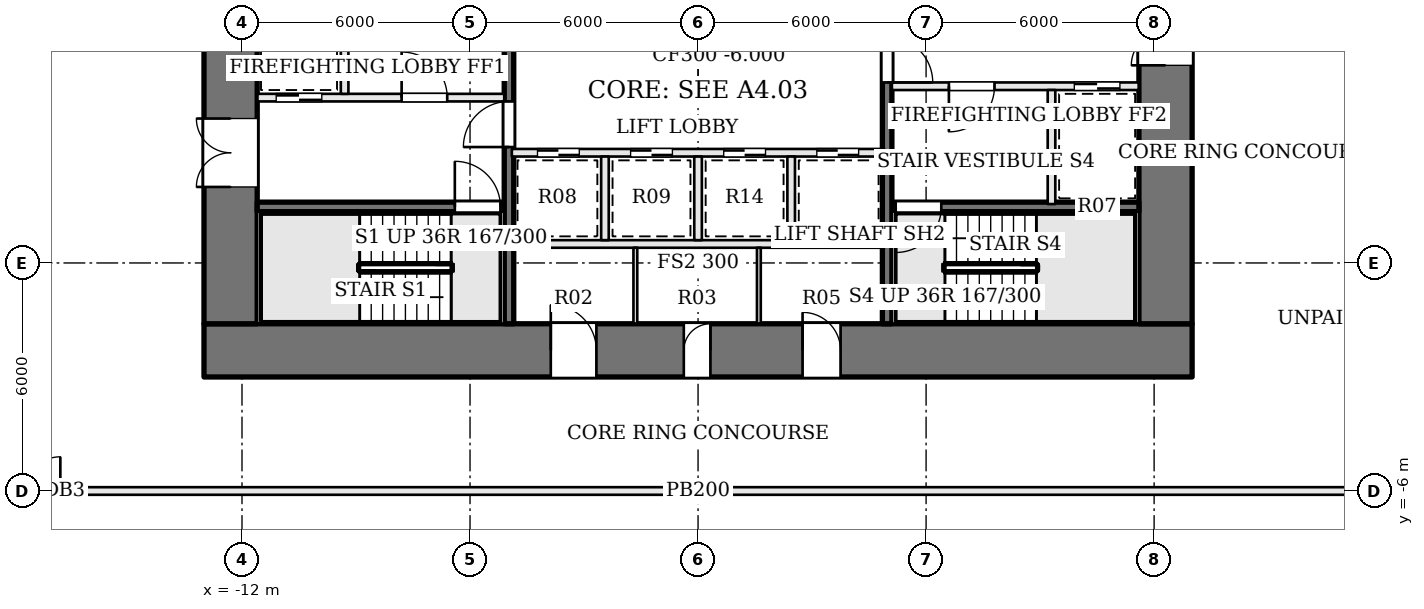
"""IFC4 building model, lengths in metres.
Left out: names, types, materials, properties, quantities, classifications, styles, units other than length and angle.
Written with IfcOpenShell. Run it as: python <this file> out.ifc"""

import sys

from ifc_helpers import new_model, si_unit, direction, frame, frame_2d, origin, place, context, subcontext, project, spatial, rectangle, extrude, element, fill, save


model = new_model("IFC4")
c1 = context("Model", 3, precision=1e-05, world=origin(), true_north=direction((0.0, 1.0)))
c2 = subcontext(c1, "Body", "Model", "MODEL_VIEW")
j1 = project(units=[si_unit("LENGTHUNIT", "METRE"), si_unit("PLANEANGLEUNIT", "RADIAN")], contexts=[c1])
p1 = place(None, origin())
s1 = spatial("IfcSite", under=j1, at=p1, CompositionType="ELEMENT")
p2 = place(p1, origin())
s2 = spatial("IfcBuilding", under=s1, at=p2, CompositionType="ELEMENT")
p3 = place(p2, frame((0.0, 0.0, -6.0)))
s3 = spatial("IfcBuildingStorey", under=s2, at=p3, CompositionType="ELEMENT", Elevation=-6.0)
p4 = place(p3, frame((-13.0, -2.3, 0.0), z_axis=(0.0, 0.0, 1.0), x_axis=(1.0, 0.0, 0.0)))
e1 = element("IfcWall", 1, at=p4, inside=s3, PredefinedType="SHEAR", context=c2, shape_type="SweptSolid", body=[
    extrude(rectangle(XDim=26.0, YDim=1.4, at=frame_2d((13.0, 0.0))), origin(), (0.0, 0.0, 1.0), 6.0),
])
p5 = place(p4, frame((9.125, 0.0, 0.0)))
e2 = element("IfcOpeningElement", 2, at=p5, cuts=e1, PredefinedType="OPENING", context=c2, shape_type="SweptSolid", body=[
    extrude(rectangle(XDim=1.2, YDim=2.1, at=frame_2d((0.6, 1.05))), frame((0.0, 0.71, 0.0), z_axis=(0.0, -1.0, 0.0), x_axis=(1.0, 0.0, 0.0)), (0.0, 0.0, 1.0), 1.42),
])
p6 = place(p4, frame((12.625, 0.0, 0.0)))
e3 = element("IfcOpeningElement", 3, at=p6, cuts=e1, PredefinedType="OPENING", context=c2, shape_type="SweptSolid", body=[
    extrude(rectangle(XDim=0.7, YDim=2.1, at=frame_2d((0.35, 1.05))), frame((0.0, 0.71, 0.0), z_axis=(0.0, -1.0, 0.0), x_axis=(1.0, 0.0, 0.0)), (0.0, 0.0, 1.0), 1.42),
])
p7 = place(p4, frame((15.75, 0.0, 0.0)))
e4 = element("IfcOpeningElement", 4, at=p7, cuts=e1, PredefinedType="OPENING", context=c2, shape_type="SweptSolid", body=[
    extrude(rectangle(XDim=1.0, YDim=2.1, at=frame_2d((0.5, 1.05))), frame((0.0, 0.71, 0.0), z_axis=(0.0, -1.0, 0.0), x_axis=(1.0, 0.0, 0.0)), (0.0, 0.0, 1.0), 1.42),
])
p8 = place(p3, frame((12.3, -1.6, 0.0), z_axis=(0.0, 0.0, 1.0), x_axis=(0.0, 1.0, 0.0)))
e5 = element("IfcWall", 5, at=p8, inside=s3, PredefinedType="SHEAR", context=c2, shape_type="SweptSolid", body=[
    extrude(rectangle(XDim=12.2, YDim=1.4, at=frame_2d((6.1, 0.0))), origin(), (0.0, 0.0, 1.0), 6.0),
])
p9 = place(p8, frame((6.8, 0.0, 0.0)))
e6 = element("IfcOpeningElement", 6, at=p9, cuts=e5, PredefinedType="OPENING", context=c2, shape_type="SweptSolid", body=[
    extrude(rectangle(XDim=1.8, YDim=2.1, at=frame_2d((0.9, 1.05))), frame((0.0, 0.71, 0.0), z_axis=(0.0, -1.0, 0.0), x_axis=(1.0, 0.0, 0.0)), (0.0, 0.0, 1.0), 1.42),
])
p10 = place(p3, frame((-12.3, -1.6, 0.0), z_axis=(0.0, 0.0, 1.0), x_axis=(0.0, 1.0, 0.0)))
e7 = element("IfcWall", 7, at=p10, inside=s3, PredefinedType="SHEAR", context=c2, shape_type="SweptSolid", body=[
    extrude(rectangle(XDim=12.2, YDim=1.4, at=frame_2d((6.1, 0.0))), origin(), (0.0, 0.0, 1.0), 6.0),
])
p11 = place(p10, frame((3.6, 0.0, 0.0)))
e8 = element("IfcOpeningElement", 8, at=p11, cuts=e7, PredefinedType="OPENING", context=c2, shape_type="SweptSolid", body=[
    extrude(rectangle(XDim=1.8, YDim=2.1, at=frame_2d((0.9, 1.05))), frame((0.0, 0.71, 0.0), z_axis=(0.0, -1.0, 0.0), x_axis=(1.0, 0.0, 0.0)), (0.0, 0.0, 1.0), 1.42),
])
p12 = place(p3, frame((-11.6, 1.475, 0.0), z_axis=(0.0, 0.0, 1.0), x_axis=(1.0, 0.0, 0.0)))
e9 = element("IfcWall", 9, at=p12, inside=s3, PredefinedType="SOLIDWALL", context=c2, shape_type="SweptSolid", body=[
    extrude(rectangle(XDim=6.5, YDim=0.25, at=frame_2d((3.25, 0.0))), origin(), (0.0, 0.0, 1.0), 5.65),
])
p13 = place(p12, frame((5.2, 0.0, 0.0)))
e10 = element("IfcOpeningElement", 10, at=p13, cuts=e9, PredefinedType="OPENING", context=c2, shape_type="SweptSolid", body=[
    extrude(rectangle(XDim=1.2, YDim=2.1, at=frame_2d((0.6, 1.05))), frame((0.0, 0.135, 0.0), z_axis=(0.0, -1.0, 0.0), x_axis=(1.0, 0.0, 0.0)), (0.0, 0.0, 1.0), 0.27),
])
p14 = place(p3, frame((-11.6, 4.35, 0.0), z_axis=(0.0, 0.0, 1.0), x_axis=(1.0, 0.0, 0.0)))
e11 = element("IfcWall", 11, at=p14, inside=s3, PredefinedType="SOLIDWALL", context=c2, shape_type="SweptSolid", body=[
    extrude(rectangle(XDim=6.5, YDim=0.2, at=frame_2d((3.25, 0.0))), origin(), (0.0, 0.0, 1.0), 5.65),
])
p15 = place(p14, frame((3.8, 0.0, 0.0)))
e12 = element("IfcOpeningElement", 12, at=p15, cuts=e11, PredefinedType="OPENING", context=c2, shape_type="SweptSolid", body=[
    extrude(rectangle(XDim=1.2, YDim=2.1, at=frame_2d((0.6, 1.05))), frame((0.0, 0.11, 0.0), z_axis=(0.0, -1.0, 0.0), x_axis=(1.0, 0.0, 0.0)), (0.0, 0.0, 1.0), 0.22),
])
p16 = place(p14, frame((0.5, 0.0, 0.0)))
e13 = element("IfcOpeningElement", 13, at=p16, cuts=e11, PredefinedType="OPENING", context=c2, shape_type="SweptSolid", body=[
    extrude(rectangle(XDim=1.2, YDim=2.1, at=frame_2d((0.6, 1.05))), frame((0.0, 0.11, 0.0), z_axis=(0.0, -1.0, 0.0), x_axis=(1.0, 0.0, 0.0)), (0.0, 0.0, 1.0), 0.22),
])
p17 = place(p3, frame((11.6, 4.65, 0.0), z_axis=(0.0, 0.0, 1.0), x_axis=(-1.0, 0.0, 0.0)))
e14 = element("IfcWall", 14, at=p17, inside=s3, PredefinedType="SOLIDWALL", context=c2, shape_type="SweptSolid", body=[
    extrude(rectangle(XDim=6.5, YDim=0.2, at=frame_2d((3.25, 0.0))), origin(), (0.0, 0.0, 1.0), 5.65),
])
p18 = place(p17, frame((3.8, 0.0, 0.0)))
e15 = element("IfcOpeningElement", 15, at=p18, cuts=e14, PredefinedType="OPENING", context=c2, shape_type="SweptSolid", body=[
    extrude(rectangle(XDim=1.2, YDim=2.1, at=frame_2d((0.6, 1.05))), frame((0.0, 0.11, 0.0), z_axis=(0.0, -1.0, 0.0), x_axis=(1.0, 0.0, 0.0)), (0.0, 0.0, 1.0), 0.22),
])
p19 = place(p17, frame((0.5, 0.0, 0.0)))
e16 = element("IfcOpeningElement", 16, at=p19, cuts=e14, PredefinedType="OPENING", context=c2, shape_type="SweptSolid", body=[
    extrude(rectangle(XDim=1.2, YDim=2.1, at=frame_2d((0.6, 1.05))), frame((0.0, 0.11, 0.0), z_axis=(0.0, -1.0, 0.0), x_axis=(1.0, 0.0, 0.0)), (0.0, 0.0, 1.0), 0.22),
])
p20 = place(p3, frame((11.6, 1.475, 0.0), z_axis=(0.0, 0.0, 1.0), x_axis=(-1.0, 0.0, 0.0)))
e17 = element("IfcWall", 17, at=p20, inside=s3, PredefinedType="SOLIDWALL", context=c2, shape_type="SweptSolid", body=[
    extrude(rectangle(XDim=6.5, YDim=0.25, at=frame_2d((3.25, 0.0))), origin(), (0.0, 0.0, 1.0), 5.65),
])
p21 = place(p20, frame((5.2, 0.0, 0.0)))
e18 = element("IfcOpeningElement", 18, at=p21, cuts=e17, PredefinedType="OPENING", context=c2, shape_type="SweptSolid", body=[
    extrude(rectangle(XDim=1.2, YDim=2.1, at=frame_2d((0.6, 1.05))), frame((0.0, 0.135, 0.0), z_axis=(0.0, -1.0, 0.0), x_axis=(1.0, 0.0, 0.0)), (0.0, 0.0, 1.0), 0.27),
])
for number, where, z_axis, x_axis in (
    (19, (-9.3, 4.45, 0.0), (0.0, 0.0, 1.0), (0.0, 1.0, 0.0)),
    (20, (9.3, 4.55, 0.0), (0.0, 0.0, 1.0), (0.0, -1.0, 0.0)),
):
    element("IfcWall", number, at=place(p3, frame(where, z_axis=z_axis, x_axis=x_axis)), inside=s3, PredefinedType="SOLIDWALL", context=c2, shape_type="SweptSolid", body=[
        extrude(rectangle(XDim=3.0, YDim=0.2, at=frame_2d((1.5, 0.0))), origin(), (0.0, 0.0, 1.0), 5.65),
    ])
p22 = place(p3, frame((-4.975, -1.6, 0.0), z_axis=(0.0, 0.0, 1.0), x_axis=(0.0, 1.0, 0.0)))
e21 = element("IfcWall", 21, at=p22, inside=s3, PredefinedType="SOLIDWALL", context=c2, shape_type="SweptSolid", body=[
    extrude(rectangle(XDim=12.2, YDim=0.25, at=frame_2d((6.1, 0.0))), origin(), (0.0, 0.0, 1.0), 5.65),
])
p23 = place(p22, frame((4.65, 0.0, 0.0)))
e22 = element("IfcOpeningElement", 22, at=p23, cuts=e21, PredefinedType="OPENING", context=c2, shape_type="SweptSolid", body=[
    extrude(rectangle(XDim=1.2, YDim=2.1, at=frame_2d((0.6, 1.05))), frame((0.0, 0.135, 0.0), z_axis=(0.0, -1.0, 0.0), x_axis=(1.0, 0.0, 0.0)), (0.0, 0.0, 1.0), 0.27),
])
p24 = place(p3, frame((4.975, 10.6, 0.0), z_axis=(0.0, 0.0, 1.0), x_axis=(0.0, -1.0, 0.0)))
e23 = element("IfcWall", 23, at=p24, inside=s3, PredefinedType="SOLIDWALL", context=c2, shape_type="SweptSolid", body=[
    extrude(rectangle(XDim=12.2, YDim=0.25, at=frame_2d((6.1, 0.0))), origin(), (0.0, 0.0, 1.0), 5.65),
])
p25 = place(p24, frame((4.65, 0.0, 0.0)))
e24 = element("IfcOpeningElement", 24, at=p25, cuts=e23, PredefinedType="OPENING", context=c2, shape_type="SweptSolid", body=[
    extrude(rectangle(XDim=1.2, YDim=2.1, at=frame_2d((0.6, 1.05))), frame((0.0, 0.135, 0.0), z_axis=(0.0, -1.0, 0.0), x_axis=(1.0, 0.0, 0.0)), (0.0, 0.0, 1.0), 0.27),
])
p26 = place(p3, frame((-4.9, 0.5, 0.0), z_axis=(0.0, 0.0, 1.0), x_axis=(1.0, 0.0, 0.0)))
e25 = element("IfcWall", 25, at=p26, inside=s3, PredefinedType="SOLIDWALL", context=c2, shape_type="SweptSolid", body=[
    extrude(rectangle(XDim=9.8, YDim=0.2, at=frame_2d((4.9, 0.0))), origin(), (0.0, 0.0, 1.0), 5.65),
])
p27 = place(p3, frame((-4.9, 2.9, 0.0), z_axis=(0.0, 0.0, 1.0), x_axis=(1.0, 0.0, 0.0)))
e26 = element("IfcWall", 26, at=p27, inside=s3, PredefinedType="SOLIDWALL", context=c2, shape_type="SweptSolid", body=[
    extrude(rectangle(XDim=9.8, YDim=0.2, at=frame_2d((4.9, 0.0))), origin(), (0.0, 0.0, 1.0), 5.65),
])
p28 = place(p27, frame((0.675, 0.0, 0.0)))
e27 = element("IfcOpeningElement", 27, at=p28, cuts=e26, PredefinedType="OPENING", context=c2, shape_type="SweptSolid", body=[
    extrude(rectangle(XDim=1.1, YDim=2.1, at=frame_2d((0.55, 1.05))), frame((0.0, 0.11, 0.0), z_axis=(0.0, -1.0, 0.0), x_axis=(1.0, 0.0, 0.0)), (0.0, 0.0, 1.0), 0.22),
])
p29 = place(p27, frame((3.125, 0.0, 0.0)))
e28 = element("IfcOpeningElement", 28, at=p29, cuts=e26, PredefinedType="OPENING", context=c2, shape_type="SweptSolid", body=[
    extrude(rectangle(XDim=1.1, YDim=2.1, at=frame_2d((0.55, 1.05))), frame((0.0, 0.11, 0.0), z_axis=(0.0, -1.0, 0.0), x_axis=(1.0, 0.0, 0.0)), (0.0, 0.0, 1.0), 0.22),
])
p30 = place(p27, frame((5.575, 0.0, 0.0)))
e29 = element("IfcOpeningElement", 29, at=p30, cuts=e26, PredefinedType="OPENING", context=c2, shape_type="SweptSolid", body=[
    extrude(rectangle(XDim=1.1, YDim=2.1, at=frame_2d((0.55, 1.05))), frame((0.0, 0.11, 0.0), z_axis=(0.0, -1.0, 0.0), x_axis=(1.0, 0.0, 0.0)), (0.0, 0.0, 1.0), 0.22),
])
p31 = place(p27, frame((8.025, 0.0, 0.0)))
e30 = element("IfcOpeningElement", 30, at=p31, cuts=e26, PredefinedType="OPENING", context=c2, shape_type="SweptSolid", body=[
    extrude(rectangle(XDim=1.1, YDim=2.1, at=frame_2d((0.55, 1.05))), frame((0.0, 0.11, 0.0), z_axis=(0.0, -1.0, 0.0), x_axis=(1.0, 0.0, 0.0)), (0.0, 0.0, 1.0), 0.22),
])
for number, where, z_axis, x_axis in (
    (31, (-2.45, 0.6, 0.0), (0.0, 0.0, 1.0), (0.0, 1.0, 0.0)),
    (32, (0.0, 0.6, 0.0), (0.0, 0.0, 1.0), (0.0, 1.0, 0.0)),
    (33, (2.45, 0.6, 0.0), (0.0, 0.0, 1.0), (0.0, 1.0, 0.0)),
):
    element("IfcWall", number, at=place(p3, frame(where, z_axis=z_axis, x_axis=x_axis)), inside=s3, PredefinedType="SOLIDWALL", context=c2, shape_type="SweptSolid", body=[
        extrude(rectangle(XDim=2.2, YDim=0.2, at=frame_2d((1.1, 0.0))), origin(), (0.0, 0.0, 1.0), 5.65),
    ])
for number, where, z_axis, x_axis in (
    (34, (-1.65, -1.6, 0.0), (0.0, 0.0, 1.0), (0.0, 1.0, 0.0)),
    (35, (1.6, -1.6, 0.0), (0.0, 0.0, 1.0), (0.0, 1.0, 0.0)),
):
    element("IfcWall", number, at=place(p3, frame(where, z_axis=z_axis, x_axis=x_axis)), inside=s3, PredefinedType="PARTITIONING", context=c2, shape_type="SweptSolid", body=[
        extrude(rectangle(XDim=2.0, YDim=0.1, at=frame_2d((1.0, 0.0))), origin(), (0.0, 0.0, 1.0), 5.65),
    ])
p32 = place(p3, frame((-27.9, -6.0, 0.0), z_axis=(0.0, 0.0, 1.0), x_axis=(1.0, 0.0, 0.0)))
e36 = element("IfcWall", 36, at=p32, inside=s3, PredefinedType="PARTITIONING", context=c2, shape_type="SweptSolid", body=[
    extrude(rectangle(XDim=55.8, YDim=0.2, at=frame_2d((27.9, 0.0))), origin(), (0.0, 0.0, 1.0), 5.148),
])
p33 = place(p32, frame((0.5, 0.0, 0.0)))
e37 = element("IfcOpeningElement", 37, at=p33, cuts=e36, PredefinedType="OPENING", context=c2, shape_type="SweptSolid", body=[
    extrude(rectangle(XDim=1.2, YDim=2.1, at=frame_2d((0.6, 1.05))), frame((0.0, 0.11, 0.0), z_axis=(0.0, -1.0, 0.0), x_axis=(1.0, 0.0, 0.0)), (0.0, 0.0, 1.0), 0.22),
])
p34 = place(p32, frame((1.94, 0.0, 0.0)))
e38 = element("IfcOpeningElement", 38, at=p34, cuts=e36, PredefinedType="OPENING", context=c2, shape_type="SweptSolid", body=[
    extrude(rectangle(XDim=1.2, YDim=2.1, at=frame_2d((0.6, 1.05))), frame((0.0, 0.11, 0.0), z_axis=(0.0, -1.0, 0.0), x_axis=(1.0, 0.0, 0.0)), (0.0, 0.0, 1.0), 0.22),
])
p35 = place(p32, frame((3.38, 0.0, 0.0)))
e39 = element("IfcOpeningElement", 39, at=p35, cuts=e36, PredefinedType="OPENING", context=c2, shape_type="SweptSolid", body=[
    extrude(rectangle(XDim=1.2, YDim=2.1, at=frame_2d((0.6, 1.05))), frame((0.0, 0.11, 0.0), z_axis=(0.0, -1.0, 0.0), x_axis=(1.0, 0.0, 0.0)), (0.0, 0.0, 1.0), 0.22),
])
p36 = place(p32, frame((4.82, 0.0, 0.0)))
e40 = element("IfcOpeningElement", 40, at=p36, cuts=e36, PredefinedType="OPENING", context=c2, shape_type="SweptSolid", body=[
    extrude(rectangle(XDim=1.2, YDim=2.1, at=frame_2d((0.6, 1.05))), frame((0.0, 0.11, 0.0), z_axis=(0.0, -1.0, 0.0), x_axis=(1.0, 0.0, 0.0)), (0.0, 0.0, 1.0), 0.22),
])
p37 = place(p32, frame((6.5, 0.0, 0.0)))
e41 = element("IfcOpeningElement", 41, at=p37, cuts=e36, PredefinedType="OPENING", context=c2, shape_type="SweptSolid", body=[
    extrude(rectangle(XDim=1.2, YDim=2.1, at=frame_2d((0.6, 1.05))), frame((0.0, 0.11, 0.0), z_axis=(0.0, -1.0, 0.0), x_axis=(1.0, 0.0, 0.0)), (0.0, 0.0, 1.0), 0.22),
])
p38 = place(p32, frame((7.94, 0.0, 0.0)))
e42 = element("IfcOpeningElement", 42, at=p38, cuts=e36, PredefinedType="OPENING", context=c2, shape_type="SweptSolid", body=[
    extrude(rectangle(XDim=1.2, YDim=2.1, at=frame_2d((0.6, 1.05))), frame((0.0, 0.11, 0.0), z_axis=(0.0, -1.0, 0.0), x_axis=(1.0, 0.0, 0.0)), (0.0, 0.0, 1.0), 0.22),
])
p39 = place(p32, frame((9.32, 0.0, 0.0)))
e43 = element("IfcOpeningElement", 43, at=p39, cuts=e36, PredefinedType="OPENING", context=c2, shape_type="SweptSolid", body=[
    extrude(rectangle(XDim=1.8, YDim=2.1, at=frame_2d((0.9, 1.05))), frame((0.0, 0.11, 0.0), z_axis=(0.0, -1.0, 0.0), x_axis=(1.0, 0.0, 0.0)), (0.0, 0.0, 1.0), 0.22),
])
p40 = place(p11, origin())
e44 = element("IfcDoor", 44, at=p40, inside=s3, OperationType="DOUBLE_DOOR_SINGLE_SWING", PredefinedType="DOOR", context=c2, shape_type="SweptSolid", body=[
    extrude(rectangle(XDim=1.8, YDim=2.1, at=frame_2d((0.9, 1.05))), frame((0.0, 0.025, 0.0), z_axis=(0.0, -1.0, 0.0), x_axis=(1.0, 0.0, 0.0)), (0.0, 0.0, 1.0), 0.05),
])
fill(e8, e44)
p41 = place(p9, origin())
e45 = element("IfcDoor", 45, at=p41, inside=s3, OperationType="DOUBLE_DOOR_SINGLE_SWING", PredefinedType="DOOR", context=c2, shape_type="SweptSolid", body=[
    extrude(rectangle(XDim=1.8, YDim=2.1, at=frame_2d((0.9, 1.05))), frame((0.0, 0.025, 0.0), z_axis=(0.0, -1.0, 0.0), x_axis=(1.0, 0.0, 0.0)), (0.0, 0.0, 1.0), 0.05),
])
fill(e6, e45)
p42 = place(p23, origin())
e46 = element("IfcDoor", 46, at=p42, inside=s3, OperationType="SINGLE_SWING_LEFT", PredefinedType="DOOR", context=c2, shape_type="SweptSolid", body=[
    extrude(rectangle(XDim=1.2, YDim=2.1, at=frame_2d((0.6, 1.05))), frame((0.0, 0.025, 0.0), z_axis=(0.0, -1.0, 0.0), x_axis=(1.0, 0.0, 0.0)), (0.0, 0.0, 1.0), 0.05),
])
fill(e22, e46)
p43 = place(p25, origin())
e47 = element("IfcDoor", 47, at=p43, inside=s3, OperationType="SINGLE_SWING_RIGHT", PredefinedType="DOOR", context=c2, shape_type="SweptSolid", body=[
    extrude(rectangle(XDim=1.2, YDim=2.1, at=frame_2d((0.6, 1.05))), frame((0.0, 0.025, 0.0), z_axis=(0.0, -1.0, 0.0), x_axis=(1.0, 0.0, 0.0)), (0.0, 0.0, 1.0), 0.05),
])
fill(e24, e47)
p44 = place(p15, origin())
e48 = element("IfcDoor", 48, at=p44, inside=s3, OperationType="SINGLE_SWING_LEFT", PredefinedType="DOOR", context=c2, shape_type="SweptSolid", body=[
    extrude(rectangle(XDim=1.2, YDim=2.1, at=frame_2d((0.6, 1.05))), frame((0.0, 0.025, 0.0), z_axis=(0.0, -1.0, 0.0), x_axis=(1.0, 0.0, 0.0)), (0.0, 0.0, 1.0), 0.05),
])
fill(e12, e48)
p45 = place(p18, origin())
e49 = element("IfcDoor", 49, at=p45, inside=s3, OperationType="SINGLE_SWING_RIGHT", PredefinedType="DOOR", context=c2, shape_type="SweptSolid", body=[
    extrude(rectangle(XDim=1.2, YDim=2.1, at=frame_2d((0.6, 1.05))), frame((0.0, 0.025, 0.0), z_axis=(0.0, -1.0, 0.0), x_axis=(1.0, 0.0, 0.0)), (0.0, 0.0, 1.0), 0.05),
])
fill(e15, e49)
p46 = place(p13, origin())
e50 = element("IfcDoor", 50, at=p46, inside=s3, OperationType="SINGLE_SWING_LEFT", PredefinedType="DOOR", context=c2, shape_type="SweptSolid", body=[
    extrude(rectangle(XDim=1.2, YDim=2.1, at=frame_2d((0.6, 1.05))), frame((0.0, 0.025, 0.0), z_axis=(0.0, -1.0, 0.0), x_axis=(1.0, 0.0, 0.0)), (0.0, 0.0, 1.0), 0.05),
])
fill(e10, e50)
p47 = place(p21, origin())
e51 = element("IfcDoor", 51, at=p47, inside=s3, OperationType="SINGLE_SWING_RIGHT", PredefinedType="DOOR", context=c2, shape_type="SweptSolid", body=[
    extrude(rectangle(XDim=1.2, YDim=2.1, at=frame_2d((0.6, 1.05))), frame((0.0, 0.025, 0.0), z_axis=(0.0, -1.0, 0.0), x_axis=(1.0, 0.0, 0.0)), (0.0, 0.0, 1.0), 0.05),
])
fill(e18, e51)
p48 = place(p16, origin())
e52 = element("IfcDoor", 52, at=p48, inside=s3, OperationType="SLIDING_TO_RIGHT", PredefinedType="DOOR", context=c2, shape_type="SweptSolid", body=[
    extrude(rectangle(XDim=1.2, YDim=2.1, at=frame_2d((0.6, 1.05))), frame((0.0, 0.025, 0.0), z_axis=(0.0, -1.0, 0.0), x_axis=(1.0, 0.0, 0.0)), (0.0, 0.0, 1.0), 0.05),
])
fill(e13, e52)
p49 = place(p19, origin())
e53 = element("IfcDoor", 53, at=p49, inside=s3, OperationType="SLIDING_TO_RIGHT", PredefinedType="DOOR", context=c2, shape_type="SweptSolid", body=[
    extrude(rectangle(XDim=1.2, YDim=2.1, at=frame_2d((0.6, 1.05))), frame((0.0, 0.025, 0.0), z_axis=(0.0, -1.0, 0.0), x_axis=(1.0, 0.0, 0.0)), (0.0, 0.0, 1.0), 0.05),
])
fill(e16, e53)
p50 = place(p28, origin())
e54 = element("IfcDoor", 54, at=p50, inside=s3, OperationType="SLIDING_TO_RIGHT", PredefinedType="DOOR", context=c2, shape_type="SweptSolid", body=[
    extrude(rectangle(XDim=1.1, YDim=2.1, at=frame_2d((0.55, 1.05))), frame((0.0, 0.025, 0.0), z_axis=(0.0, -1.0, 0.0), x_axis=(1.0, 0.0, 0.0)), (0.0, 0.0, 1.0), 0.05),
])
fill(e27, e54)
p51 = place(p29, origin())
e55 = element("IfcDoor", 55, at=p51, inside=s3, OperationType="SLIDING_TO_LEFT", PredefinedType="DOOR", context=c2, shape_type="SweptSolid", body=[
    extrude(rectangle(XDim=1.1, YDim=2.1, at=frame_2d((0.55, 1.05))), frame((0.0, 0.025, 0.0), z_axis=(0.0, -1.0, 0.0), x_axis=(1.0, 0.0, 0.0)), (0.0, 0.0, 1.0), 0.05),
])
fill(e28, e55)
p52 = place(p30, origin())
e56 = element("IfcDoor", 56, at=p52, inside=s3, OperationType="SLIDING_TO_LEFT", PredefinedType="DOOR", context=c2, shape_type="SweptSolid", body=[
    extrude(rectangle(XDim=1.1, YDim=2.1, at=frame_2d((0.55, 1.05))), frame((0.0, 0.025, 0.0), z_axis=(0.0, -1.0, 0.0), x_axis=(1.0, 0.0, 0.0)), (0.0, 0.0, 1.0), 0.05),
])
fill(e29, e56)
p53 = place(p31, origin())
e57 = element("IfcDoor", 57, at=p53, inside=s3, OperationType="SLIDING_TO_RIGHT", PredefinedType="DOOR", context=c2, shape_type="SweptSolid", body=[
    extrude(rectangle(XDim=1.1, YDim=2.1, at=frame_2d((0.55, 1.05))), frame((0.0, 0.025, 0.0), z_axis=(0.0, -1.0, 0.0), x_axis=(1.0, 0.0, 0.0)), (0.0, 0.0, 1.0), 0.05),
])
fill(e30, e57)
p54 = place(p5, origin())
e58 = element("IfcDoor", 58, at=p54, inside=s3, OperationType="SINGLE_SWING_LEFT", PredefinedType="DOOR", context=c2, shape_type="SweptSolid", body=[
    extrude(rectangle(XDim=1.2, YDim=2.1, at=frame_2d((0.6, 1.05))), frame((0.0, 0.025, 0.0), z_axis=(0.0, -1.0, 0.0), x_axis=(1.0, 0.0, 0.0)), (0.0, 0.0, 1.0), 0.05),
])
fill(e2, e58)
p55 = place(p6, origin())
e59 = element("IfcDoor", 59, at=p55, inside=s3, OperationType="SINGLE_SWING_RIGHT", PredefinedType="DOOR", context=c2, shape_type="SweptSolid", body=[
    extrude(rectangle(XDim=0.7, YDim=2.1, at=frame_2d((0.35, 1.05))), frame((0.0, 0.025, 0.0), z_axis=(0.0, -1.0, 0.0), x_axis=(1.0, 0.0, 0.0)), (0.0, 0.0, 1.0), 0.05),
])
fill(e3, e59)
p56 = place(p7, origin())
e60 = element("IfcDoor", 60, at=p56, inside=s3, OperationType="SINGLE_SWING_LEFT", PredefinedType="DOOR", context=c2, shape_type="SweptSolid", body=[
    extrude(rectangle(XDim=1.0, YDim=2.1, at=frame_2d((0.5, 1.05))), frame((0.0, 0.025, 0.0), z_axis=(0.0, -1.0, 0.0), x_axis=(1.0, 0.0, 0.0)), (0.0, 0.0, 1.0), 0.05),
])
fill(e4, e60)
p57 = place(p39, origin())
e61 = element("IfcDoor", 61, at=p57, inside=s3, OperationType="DOUBLE_DOOR_SINGLE_SWING", PredefinedType="DOOR", context=c2, shape_type="SweptSolid", body=[
    extrude(rectangle(XDim=1.8, YDim=2.1, at=frame_2d((0.9, 1.05))), frame((0.0, 0.025, 0.0), z_axis=(0.0, -1.0, 0.0), x_axis=(1.0, 0.0, 0.0)), (0.0, 0.0, 1.0), 0.05),
])
fill(e43, e61)
save(model, sys.argv[1])
